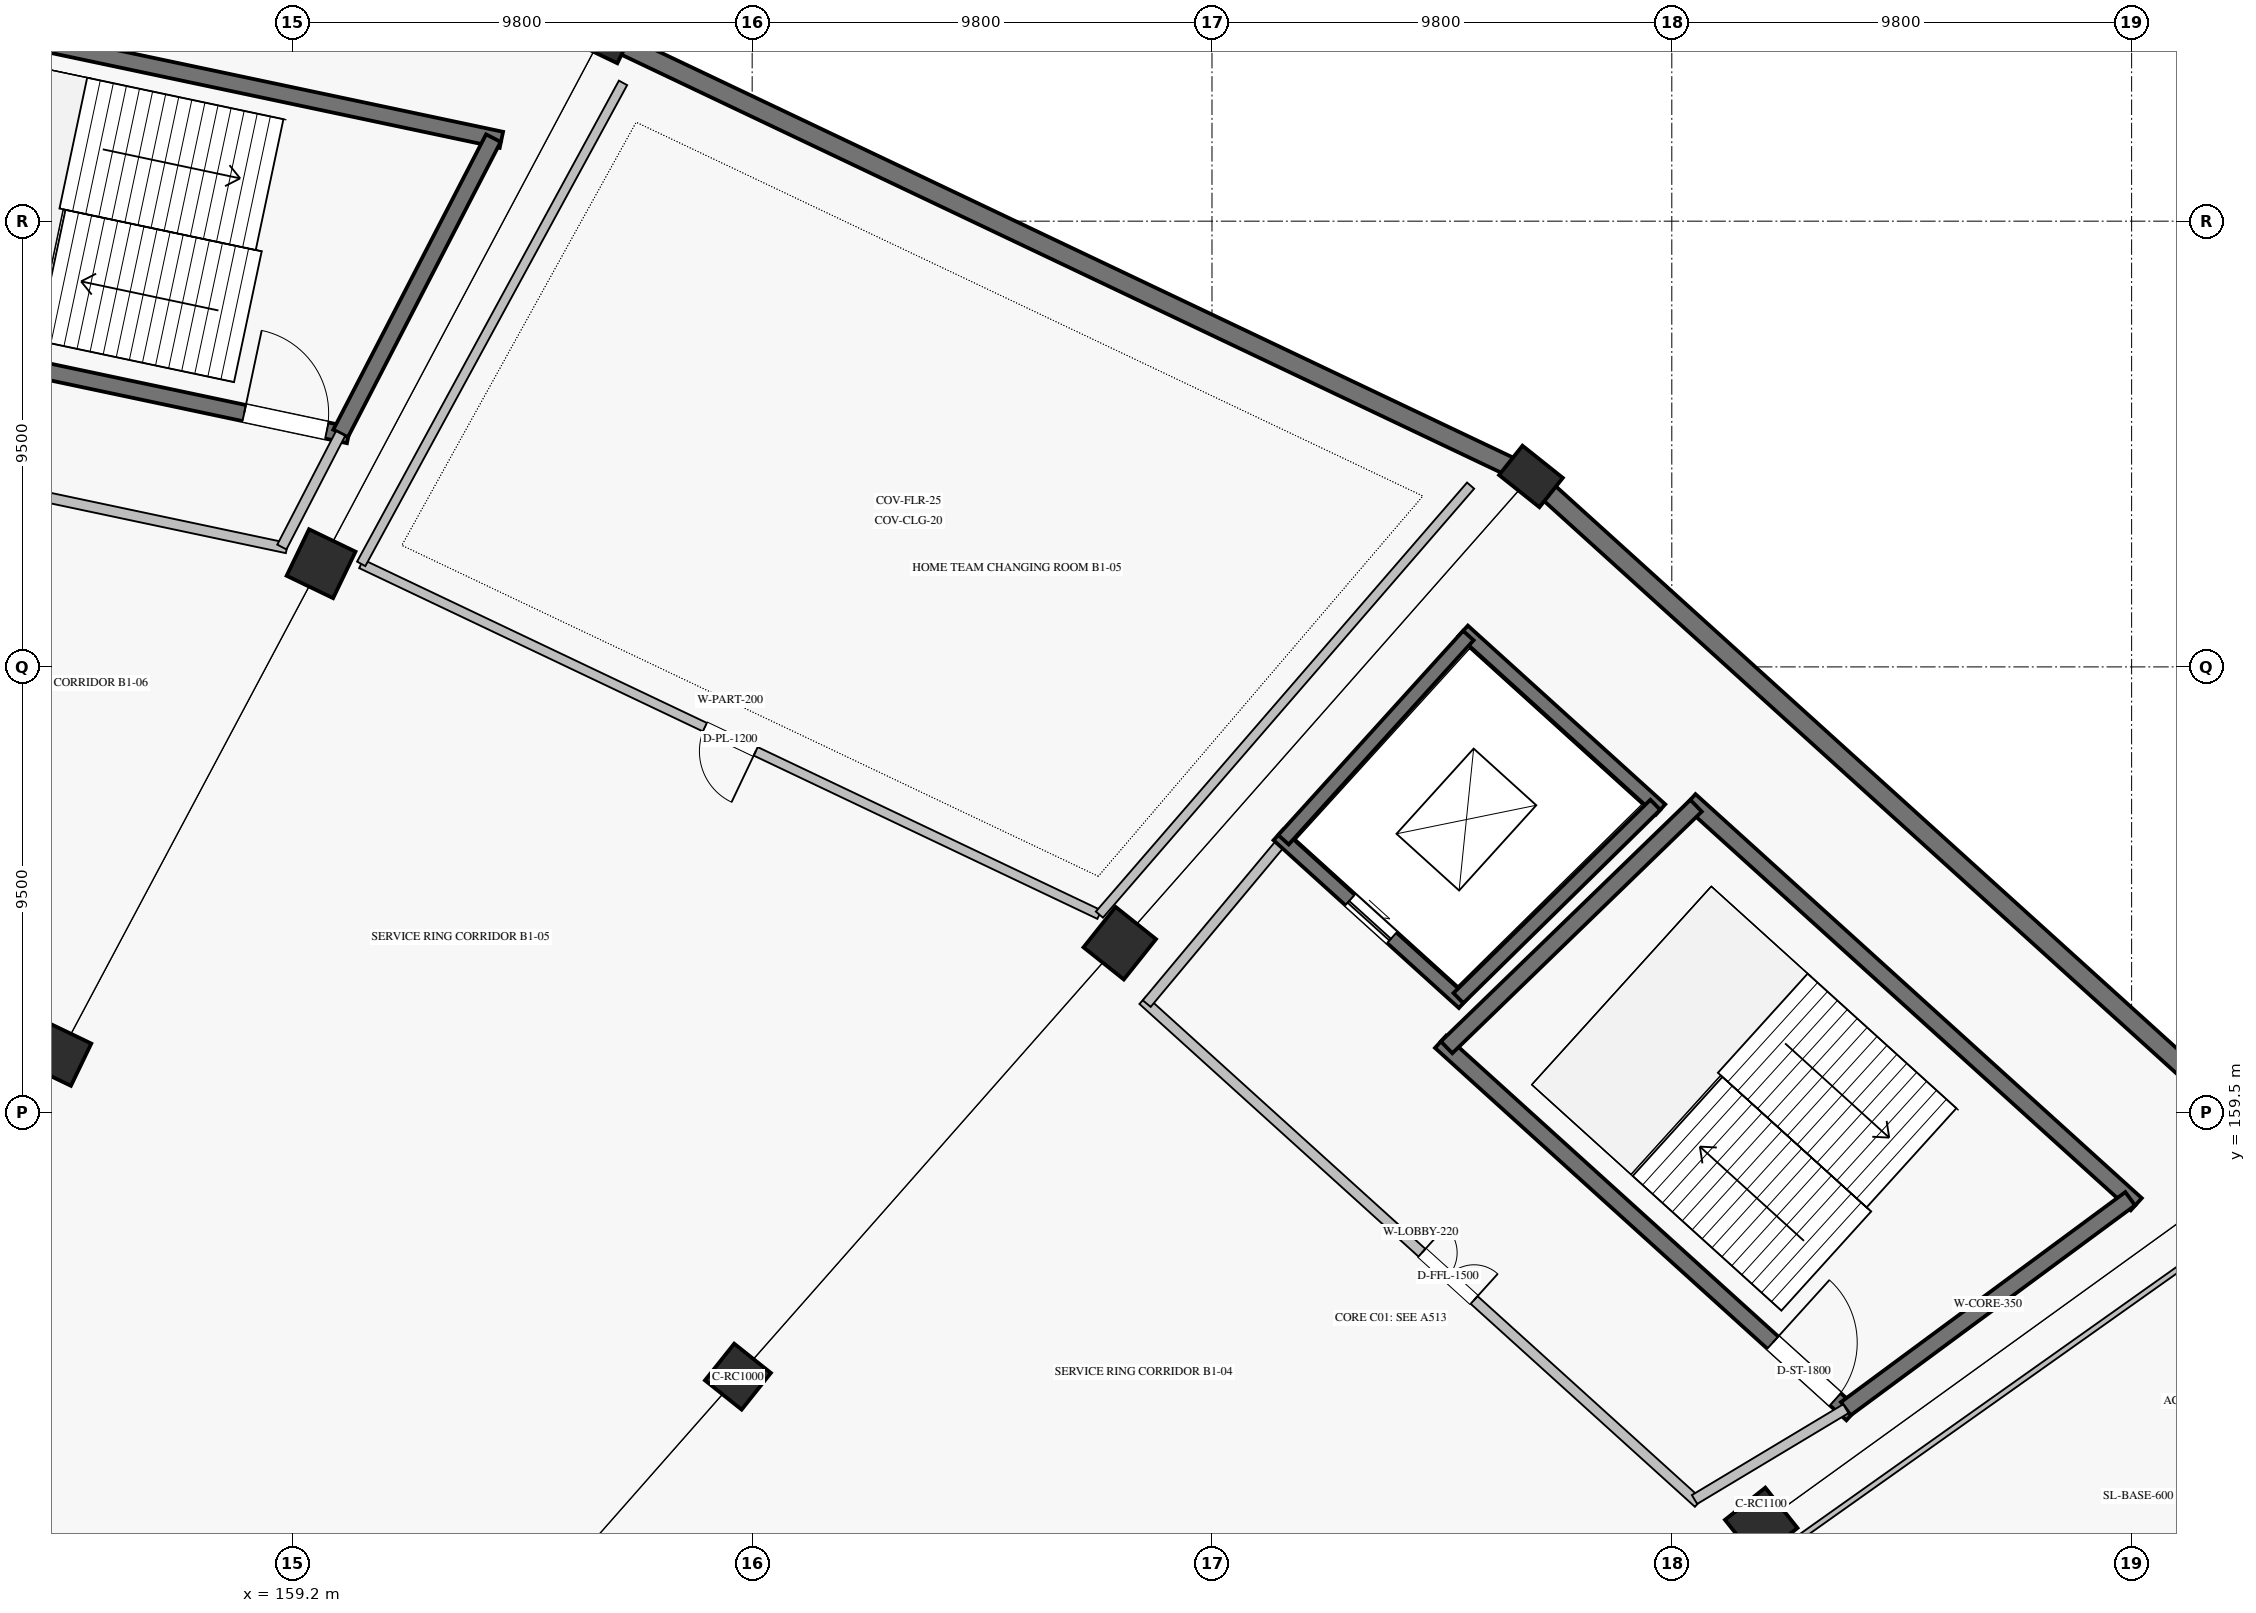
"""IFC4 building model, lengths in metres.
Left out: names, types, materials, properties, quantities, classifications, styles, units other than length and angle.
Written with IfcOpenShell. Run it as: python <this file> out.ifc"""

import sys

from ifc_helpers import new_model, si_unit, direction, frame, frame_2d, origin, origin_2d, place, context, subcontext, project, spatial, rectangle, extrude, element, fill, save


model = new_model("IFC4")
c1 = context("Model", 3, precision=1e-05, world=origin(), true_north=direction((0.0, 1.0)))
c2 = subcontext(c1, "Body", "Model", "MODEL_VIEW")
j1 = project(units=[si_unit("LENGTHUNIT", "METRE"), si_unit("PLANEANGLEUNIT", "RADIAN")], contexts=[c1])
p1 = place(None, origin())
s1 = spatial("IfcSite", under=j1, at=p1, CompositionType="ELEMENT")
p2 = place(p1, origin())
s2 = spatial("IfcBuilding", under=s1, at=p2, CompositionType="ELEMENT")
p3 = place(p2, frame((0.0, 0.0, -5.44)))
s3 = spatial("IfcBuildingStorey", under=s2, at=p3, CompositionType="ELEMENT", Elevation=-5.44)
for number, where, z_axis, x_axis in (
    (1, (168.697, 153.873, 0.0), (0.0, 0.0, 1.0), (0.623, 0.782, 0.0)),
    (2, (154.248, 160.739, 0.0), (0.0, 0.0, 1.0), (0.434, 0.901, 0.0)),
):
    element("IfcColumn", number, at=place(p3, frame(where, z_axis=z_axis, x_axis=x_axis)), inside=s3, PredefinedType="COLUMN", context=c2, shape_type="SweptSolid", body=[
        extrude(rectangle(XDim=1.0, YDim=1.0, at=origin_2d()), origin(), (0.0, 0.0, 1.0), 5.44),
    ])
for number, where, z_axis, x_axis in (
    (3, (190.506, 150.734, 0.0), (0.0, 0.0, 1.0), (0.782, 0.623, 0.0)),
    (4, (176.834, 163.111, 0.0), (0.0, 0.0, 1.0), (0.623, 0.782, 0.0)),
    (5, (159.812, 171.199, 0.0), (0.0, 0.0, 1.0), (0.434, 0.901, 0.0)),
):
    element("IfcColumn", number, at=place(p3, frame(where, z_axis=z_axis, x_axis=x_axis)), inside=s3, PredefinedType="COLUMN", context=c2, shape_type="SweptSolid", body=[
        extrude(rectangle(XDim=1.1, YDim=1.1, at=origin_2d()), origin(), (0.0, 0.0, 1.0), 5.44),
    ])
for number, where, z_axis, x_axis in (
    (6, (185.598, 173.059, 0.0), (0.0, 0.0, 1.0), (0.623, 0.782, 0.0)),
    (7, (165.805, 182.464, 0.0), (0.0, 0.0, 1.0), (0.434, 0.901, 0.0)),
):
    element("IfcColumn", number, at=place(p3, frame(where, z_axis=z_axis, x_axis=x_axis)), inside=s3, PredefinedType="COLUMN", context=c2, shape_type="SweptSolid", body=[
        extrude(rectangle(XDim=0.8, YDim=1.1, at=origin_2d()), origin(), (0.0, 0.0, 1.0), 5.44),
    ])
p4 = place(p3, frame((201.206, 158.929, 0.0), z_axis=(0.0, 0.0, 1.0), x_axis=(-0.741354093053, 0.671114080253, 0.0)))
e8 = element("IfcWall", 8, at=p4, inside=s3, PredefinedType="SOLIDWALL", context=c2, shape_type="SweptSolid", body=[
    extrude(rectangle(XDim=20.664, YDim=0.4, at=frame_2d((10.332, 0.0))), origin(), (0.0, 0.0, 1.0), 4.42),
])
p5 = place(p3, frame((185.246, 173.226, 0.0), z_axis=(0.0, 0.0, 1.0), x_axis=(-0.903214032263, 0.429190414528, 0.0)))
e9 = element("IfcWall", 9, at=p5, inside=s3, PredefinedType="SOLIDWALL", context=c2, shape_type="SweptSolid", body=[
    extrude(rectangle(XDim=21.134, YDim=0.4, at=frame_2d((10.567, 0.0))), origin(), (0.0, 0.0, 1.0), 4.42),
])
p6 = place(p3, frame((192.439, 153.072, 0.0), z_axis=(0.0, 0.0, 1.0), x_axis=(-0.741358227035, 0.671109513572, 0.0)))
e10 = element("IfcWall", 10, at=p6, inside=s3, PredefinedType="SHEAR", context=c2, shape_type="SweptSolid", body=[
    extrude(rectangle(XDim=11.827, YDim=0.35, at=frame_2d((5.913, 0.0))), origin(), (0.0, 0.0, 1.0), 5.14),
])
p7 = place(p6, frame((0.475, 0.0, 0.0)))
e11 = element("IfcOpeningElement", 11, at=p7, cuts=e10, PredefinedType="OPENING", context=c2, shape_type="SweptSolid", body=[
    extrude(rectangle(XDim=1.8, YDim=2.2, at=frame_2d((0.9, 1.1))), frame((0.0, 0.185, 0.0), z_axis=(0.0, -1.0, 0.0), x_axis=(1.0, 0.0, 0.0)), (0.0, 0.0, 1.0), 0.37),
])
p8 = place(p3, frame((198.499, 157.548, 0.0), z_axis=(0.0, 0.0, 1.0), x_axis=(-0.741351373721, 0.671117084183, 0.0)))
e12 = element("IfcWall", 12, at=p8, inside=s3, PredefinedType="SHEAR", context=c2, shape_type="SweptSolid", body=[
    extrude(rectangle(XDim=12.83, YDim=0.35, at=frame_2d((6.415, 0.0))), origin(), (0.0, 0.0, 1.0), 5.14),
])
p9 = place(p3, frame((192.309, 153.189, 0.0), z_axis=(0.0, 0.0, 1.0), x_axis=(0.804395625347, 0.594093997548, 0.0)))
e13 = element("IfcWall", 13, at=p9, inside=s3, PredefinedType="SHEAR", context=c2, shape_type="SweptSolid", body=[
    extrude(rectangle(XDim=7.534, YDim=0.35, at=frame_2d((3.767, 0.0))), origin(), (0.0, 0.0, 1.0), 5.14),
])
p10 = place(p3, frame((183.801, 160.892, 0.0), z_axis=(0.0, 0.0, 1.0), x_axis=(0.718297398554, 0.69573619083, 0.0)))
e14 = element("IfcWall", 14, at=p10, inside=s3, PredefinedType="SHEAR", context=c2, shape_type="SweptSolid", body=[
    extrude(rectangle(XDim=7.402, YDim=0.35, at=frame_2d((3.701, 0.0))), origin(), (0.0, 0.0, 1.0), 5.14),
])
p11 = place(p3, frame((184.163, 161.841, 0.0), z_axis=(0.0, 0.0, 1.0), x_axis=(-0.741350155641, 0.671118429736, 0.0)))
e15 = element("IfcWall", 15, at=p11, inside=s3, PredefinedType="SHEAR", context=c2, shape_type="SweptSolid", body=[
    extrude(rectangle(XDim=5.329, YDim=0.3, at=frame_2d((2.665, 0.0))), origin(), (0.0, 0.0, 1.0), 5.14),
])
p12 = place(p11, frame((2.065, 0.0, 0.0)))
e16 = element("IfcOpeningElement", 16, at=p12, cuts=e15, PredefinedType="OPENING", context=c2, shape_type="SweptSolid", body=[
    extrude(rectangle(XDim=1.2, YDim=2.2, at=frame_2d((0.6, 1.1))), frame((0.0, 0.16, 0.0), z_axis=(0.0, -1.0, 0.0), x_axis=(1.0, 0.0, 0.0)), (0.0, 0.0, 1.0), 0.32),
])
p13 = place(p3, frame((188.36, 165.961, 0.0), z_axis=(0.0, 0.0, 1.0), x_axis=(-0.74134208775, 0.671127341815, 0.0)))
e17 = element("IfcWall", 17, at=p13, inside=s3, PredefinedType="SHEAR", context=c2, shape_type="SweptSolid", body=[
    extrude(rectangle(XDim=5.675, YDim=0.3, at=frame_2d((2.837, 0.0))), origin(), (0.0, 0.0, 1.0), 5.14),
])
p14 = place(p3, frame((184.052, 161.941, 0.0), z_axis=(0.0, 0.0, 1.0), x_axis=(0.713553028001, 0.700601224828, 0.0)))
e18 = element("IfcWall", 18, at=p14, inside=s3, PredefinedType="SHEAR", context=c2, shape_type="SweptSolid", body=[
    extrude(rectangle(XDim=5.881, YDim=0.3, at=frame_2d((2.94, 0.0))), origin(), (0.0, 0.0, 1.0), 5.14),
])
p15 = place(p3, frame((180.324, 165.316, 0.0), z_axis=(0.0, 0.0, 1.0), x_axis=(0.67115829282, 0.741314067031, 0.0)))
e19 = element("IfcWall", 19, at=p15, inside=s3, PredefinedType="SHEAR", context=c2, shape_type="SweptSolid", body=[
    extrude(rectangle(XDim=5.871, YDim=0.3, at=frame_2d((2.935, 0.0))), origin(), (0.0, 0.0, 1.0), 5.14),
])
p16 = place(p3, frame((189.166, 151.181, 0.0), z_axis=(0.0, 0.0, 1.0), x_axis=(-0.741351035574, 0.671117457717, 0.0)))
e20 = element("IfcWall", 20, at=p16, inside=s3, PredefinedType="SOLIDWALL", context=c2, shape_type="SweptSolid", body=[
    extrude(rectangle(XDim=15.969, YDim=0.22, at=frame_2d((7.985, 0.0))), origin(), (0.0, 0.0, 1.0), 5.14),
])
p17 = place(p16, frame((6.447, 0.0, 0.0)))
e21 = element("IfcOpeningElement", 21, at=p17, cuts=e20, PredefinedType="OPENING", context=c2, shape_type="SweptSolid", body=[
    extrude(rectangle(XDim=1.5, YDim=2.2, at=frame_2d((0.75, 1.1))), frame((0.0, 0.12, 0.0), z_axis=(0.0, -1.0, 0.0), x_axis=(1.0, 0.0, 0.0)), (0.0, 0.0, 1.0), 0.24),
])
p18 = place(p3, frame((189.085, 151.254, 0.0), z_axis=(0.0, 0.0, 1.0), x_axis=(0.857424171966, 0.514610327654, 0.0)))
e22 = element("IfcWall", 22, at=p18, inside=s3, PredefinedType="SOLIDWALL", context=c2, shape_type="SweptSolid", body=[
    extrude(rectangle(XDim=3.76, YDim=0.22, at=frame_2d((1.88, 0.0))), origin(), (0.0, 0.0, 1.0), 5.14),
])
p19 = place(p3, frame((177.409, 161.824, 0.0), z_axis=(0.0, 0.0, 1.0), x_axis=(0.640759627034, 0.767741558315, 0.0)))
e23 = element("IfcWall", 23, at=p19, inside=s3, PredefinedType="SOLIDWALL", context=c2, shape_type="SweptSolid", body=[
    extrude(rectangle(XDim=4.549, YDim=0.22, at=frame_2d((2.274, 0.0))), origin(), (0.0, 0.0, 1.0), 5.14),
])
p20 = place(p3, frame((160.4, 173.94, 0.0), z_axis=(0.0, 0.0, 1.0), x_axis=(-0.978345203961, 0.206979858648, 0.0)))
e24 = element("IfcWall", 24, at=p20, inside=s3, PredefinedType="SHEAR", context=c2, shape_type="SweptSolid", body=[
    extrude(rectangle(XDim=12.044, YDim=0.35, at=frame_2d((6.022, 0.0))), origin(), (0.0, 0.0, 1.0), 5.14),
])
p21 = place(p20, frame((0.475, 0.0, 0.0)))
e25 = element("IfcOpeningElement", 25, at=p21, cuts=e24, PredefinedType="OPENING", context=c2, shape_type="SweptSolid", body=[
    extrude(rectangle(XDim=1.8, YDim=2.2, at=frame_2d((0.9, 1.1))), frame((0.0, 0.185, 0.0), z_axis=(0.0, -1.0, 0.0), x_axis=(1.0, 0.0, 0.0)), (0.0, 0.0, 1.0), 0.37),
])
p22 = place(p3, frame((163.655, 180.233, 0.0), z_axis=(0.0, 0.0, 1.0), x_axis=(-0.978345119536, 0.206980257705, 0.0)))
e26 = element("IfcWall", 26, at=p22, inside=s3, PredefinedType="SHEAR", context=c2, shape_type="SweptSolid", body=[
    extrude(rectangle(XDim=13.067, YDim=0.35, at=frame_2d((6.533, 0.0))), origin(), (0.0, 0.0, 1.0), 5.14),
])
p23 = place(p3, frame((160.229, 173.976, 0.0), z_axis=(0.0, 0.0, 1.0), x_axis=(0.459409796564, 0.888224430435, 0.0)))
e27 = element("IfcWall", 27, at=p23, inside=s3, PredefinedType="SHEAR", context=c2, shape_type="SweptSolid", body=[
    extrude(rectangle(XDim=7.086, YDim=0.35, at=frame_2d((3.543, 0.0))), origin(), (0.0, 0.0, 1.0), 5.14),
])
p24 = place(p3, frame((159.084, 171.532, 0.0), z_axis=(0.0, 0.0, 1.0), x_axis=(-0.978342313718, 0.206993519678, 0.0)))
e28 = element("IfcWall", 28, at=p24, inside=s3, PredefinedType="SOLIDWALL", context=c2, shape_type="SweptSolid", body=[
    extrude(rectangle(XDim=16.983, YDim=0.22, at=frame_2d((8.492, 0.0))), origin(), (0.0, 0.0, 1.0), 4.088),
])
p25 = place(p24, frame((6.903, 0.0, 0.0)))
e29 = element("IfcOpeningElement", 29, at=p25, cuts=e28, PredefinedType="OPENING", context=c2, shape_type="SweptSolid", body=[
    extrude(rectangle(XDim=1.5, YDim=2.2, at=frame_2d((0.75, 1.1))), frame((0.0, 0.12, 0.0), z_axis=(0.0, -1.0, 0.0), x_axis=(1.0, 0.0, 0.0)), (0.0, 0.0, 1.0), 0.24),
])
p26 = place(p3, frame((158.976, 171.555, 0.0), z_axis=(0.0, 0.0, 1.0), x_axis=(0.459461910618, 0.888197473928, 0.0)))
e30 = element("IfcWall", 30, at=p26, inside=s3, PredefinedType="SOLIDWALL", context=c2, shape_type="SweptSolid", body=[
    extrude(rectangle(XDim=2.725, YDim=0.22, at=frame_2d((1.363, 0.0))), origin(), (0.0, 0.0, 1.0), 5.14),
])
p27 = place(p3, frame((191.179, 150.342, 0.0), z_axis=(0.0, 0.0, 1.0), x_axis=(0.815753527099, 0.578399674122, 0.0)))
e31 = element("IfcWall", 31, at=p27, inside=s3, PredefinedType="PARTITIONING", context=c2, shape_type="SweptSolid", body=[
    extrude(rectangle(XDim=12.382, YDim=0.115, at=frame_2d((6.191, 0.0))), origin(), (0.0, 0.0, 1.0), 4.46),
])
p28 = place(p3, frame((193.467, 146.396, 0.0), z_axis=(0.0, 0.0, 1.0), x_axis=(0.846077507777, 0.533059894227, 0.0)))
e32 = element("IfcWall", 32, at=p28, inside=s3, PredefinedType="PARTITIONING", context=c2, shape_type="SweptSolid", body=[
    extrude(rectangle(XDim=12.339, YDim=0.1, at=frame_2d((6.169, 0.0))), origin(), (0.0, 0.0, 1.0), 4.46),
])
p29 = place(p3, frame((176.401, 163.72, 0.0), z_axis=(0.0, 0.0, 1.0), x_axis=(-0.903217202186, 0.429183743488, 0.0)))
e33 = element("IfcWall", 33, at=p29, inside=s3, PredefinedType="PARTITIONING", context=c2, shape_type="SweptSolid", body=[
    extrude(rectangle(XDim=17.419, YDim=0.2, at=frame_2d((8.709, 0.0))), origin(), (0.0, 0.0, 1.0), 4.46),
])
p30 = place(p29, frame((8.11, 0.0, 0.0)))
e34 = element("IfcOpeningElement", 34, at=p30, cuts=e33, PredefinedType="OPENING", context=c2, shape_type="SweptSolid", body=[
    extrude(rectangle(XDim=1.2, YDim=2.15, at=frame_2d((0.6, 1.075))), frame((0.0, 0.11, 0.0), z_axis=(0.0, -1.0, 0.0), x_axis=(1.0, 0.0, 0.0)), (0.0, 0.0, 1.0), 0.22),
])
p31 = place(p3, frame((176.401, 163.72, 0.0), z_axis=(0.0, 0.0, 1.0), x_axis=(0.654293035882, 0.756241114458, 0.0)))
e35 = element("IfcWall", 35, at=p31, inside=s3, PredefinedType="PARTITIONING", context=c2, shape_type="SweptSolid", body=[
    extrude(rectangle(XDim=12.091, YDim=0.2, at=frame_2d((6.045, 0.0))), origin(), (0.0, 0.0, 1.0), 4.46),
])
p32 = place(p3, frame((160.667, 171.196, 0.0), z_axis=(0.0, 0.0, 1.0), x_axis=(0.478125060974, 0.878291765912, 0.0)))
e36 = element("IfcWall", 36, at=p32, inside=s3, PredefinedType="PARTITIONING", context=c2, shape_type="SweptSolid", body=[
    extrude(rectangle(XDim=11.672, YDim=0.2, at=frame_2d((5.836, 0.0))), origin(), (0.0, 0.0, 1.0), 4.46),
])
p33 = place(p7, frame((1.8, 0.0, 0.0), z_axis=(0.0, 0.0, 1.0), x_axis=(-1.0, 0.0, 0.0)))
e37 = element("IfcDoor", 37, at=p33, inside=s3, OperationType="SINGLE_SWING_LEFT", PredefinedType="DOOR", context=c2, shape_type="SweptSolid", body=[
    extrude(rectangle(XDim=1.8, YDim=2.2, at=frame_2d((0.9, 1.1))), frame((0.0, 0.025, 0.0), z_axis=(0.0, -1.0, 0.0), x_axis=(1.0, 0.0, 0.0)), (0.0, 0.0, 1.0), 0.05),
])
fill(e11, e37)
p34 = place(p12, origin())
e38 = element("IfcDoor", 38, at=p34, inside=s3, OperationType="SLIDING_TO_LEFT", PredefinedType="DOOR", context=c2, shape_type="SweptSolid", body=[
    extrude(rectangle(XDim=1.2, YDim=2.2, at=frame_2d((0.6, 1.1))), frame((0.0, 0.025, 0.0), z_axis=(0.0, -1.0, 0.0), x_axis=(1.0, 0.0, 0.0)), (0.0, 0.0, 1.0), 0.05),
])
fill(e16, e38)
p35 = place(p17, frame((1.5, 0.0, 0.0), z_axis=(0.0, 0.0, 1.0), x_axis=(-1.0, 0.0, 0.0)))
e39 = element("IfcDoor", 39, at=p35, inside=s3, OperationType="DOUBLE_DOOR_SINGLE_SWING", PredefinedType="DOOR", context=c2, shape_type="SweptSolid", body=[
    extrude(rectangle(XDim=1.5, YDim=2.2, at=frame_2d((0.75, 1.1))), frame((0.0, 0.025, 0.0), z_axis=(0.0, -1.0, 0.0), x_axis=(1.0, 0.0, 0.0)), (0.0, 0.0, 1.0), 0.05),
])
fill(e21, e39)
p36 = place(p21, frame((1.8, 0.0, 0.0), z_axis=(0.0, 0.0, 1.0), x_axis=(-1.0, 0.0, 0.0)))
e40 = element("IfcDoor", 40, at=p36, inside=s3, OperationType="SINGLE_SWING_LEFT", PredefinedType="DOOR", context=c2, shape_type="SweptSolid", body=[
    extrude(rectangle(XDim=1.8, YDim=2.2, at=frame_2d((0.9, 1.1))), frame((0.0, 0.025, 0.0), z_axis=(0.0, -1.0, 0.0), x_axis=(1.0, 0.0, 0.0)), (0.0, 0.0, 1.0), 0.05),
])
fill(e25, e40)
p37 = place(p30, origin())
e41 = element("IfcDoor", 41, at=p37, inside=s3, OperationType="SINGLE_SWING_LEFT", PredefinedType="DOOR", context=c2, shape_type="SweptSolid", body=[
    extrude(rectangle(XDim=1.2, YDim=2.15, at=frame_2d((0.6, 1.075))), frame((0.0, 0.025, 0.0), z_axis=(0.0, -1.0, 0.0), x_axis=(1.0, 0.0, 0.0)), (0.0, 0.0, 1.0), 0.05),
])
fill(e34, e41)
save(model, sys.argv[1])
